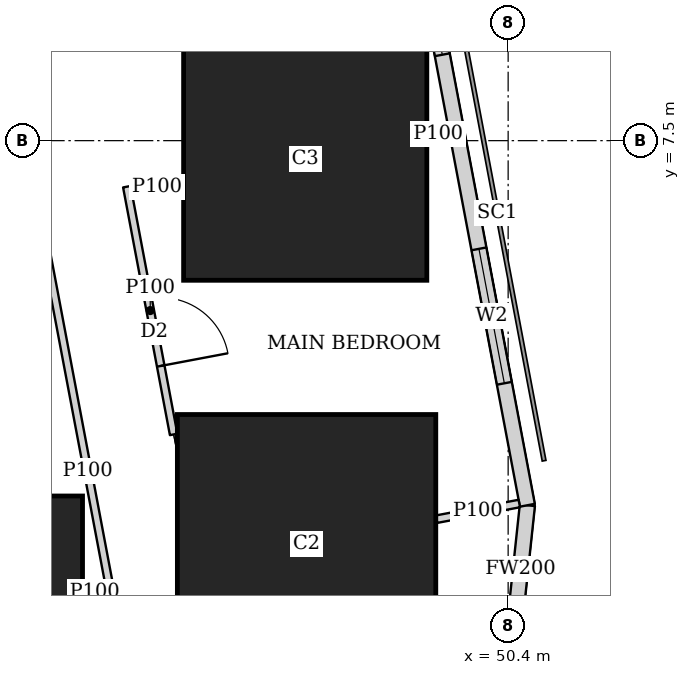
"""IFC4 building model, lengths in metres.
Left out: names, types, materials, properties, quantities, classifications, styles, units other than length and angle.
Written with IfcOpenShell. Run it as: python <this file> out.ifc"""

import sys

from ifc_helpers import new_model, si_unit, direction, frame, frame_2d, origin, origin_2d, place, context, subcontext, project, spatial, rectangle, extrude, element, fill, save


model = new_model("IFC4")
c1 = context("Model", 3, precision=1e-05, world=origin(), true_north=direction((0.0, 1.0)))
c2 = subcontext(c1, "Body", "Model", "MODEL_VIEW")
j1 = project(units=[si_unit("LENGTHUNIT", "METRE"), si_unit("PLANEANGLEUNIT", "RADIAN")], contexts=[c1])
p1 = place(None, origin())
s1 = spatial("IfcSite", under=j1, at=p1, CompositionType="ELEMENT")
p2 = place(p1, origin())
s2 = spatial("IfcBuilding", under=s1, at=p2, CompositionType="ELEMENT")
p3 = place(p2, frame((0.0, 0.0, 20.0)))
s3 = spatial("IfcBuildingStorey", under=s2, at=p3, CompositionType="ELEMENT", Elevation=20.0)
p4 = place(p3, frame((43.2, 1.225, 0.0), z_axis=(0.0, 0.0, 1.0), x_axis=(1.0, 0.0, 0.0)))
e1 = element("IfcColumn", 1, at=p4, inside=s3, PredefinedType="COLUMN", context=c2, shape_type="SweptSolid", body=[
    extrude(rectangle(XDim=3.2, YDim=3.2, at=origin_2d()), origin(), (0.0, 0.0, 1.0), 3.75),
])
p5 = place(p3, frame((47.748, 2.197, 0.0), z_axis=(0.0, 0.0, 1.0), x_axis=(1.0, 0.0, 0.0)))
e2 = element("IfcColumn", 2, at=p5, inside=s3, PredefinedType="COLUMN", context=c2, shape_type="SweptSolid", body=[
    extrude(rectangle(XDim=3.4, YDim=3.4, at=origin_2d()), origin(), (0.0, 0.0, 1.0), 3.75),
])
p6 = place(p3, frame((47.73, 7.263, -0.3), z_axis=(0.0, 0.0, 1.0), x_axis=(1.0, 0.0, 0.0)))
e3 = element("IfcColumn", 3, at=p6, inside=s3, PredefinedType="COLUMN", context=c2, shape_type="SweptSolid", body=[
    extrude(rectangle(XDim=3.2, YDim=3.2, at=origin_2d()), origin(), (0.0, 0.0, 1.0), 4.05),
])
p7 = place(p3, frame((50.474, 1.025, 0.0), z_axis=(0.0, 0.0, 1.0), x_axis=(0.106047815515, 0.994361031429, 0.0)))
e4 = element("IfcWall", 4, at=p7, inside=s3, PredefinedType="SOLIDWALL", context=c2, shape_type="SweptSolid", body=[
    extrude(rectangle(XDim=1.688, YDim=0.2, at=frame_2d((0.844, 0.0))), origin(), (0.0, 0.0, 1.0), 3.5),
])
p8 = place(p3, frame((50.653, 2.703, 0.0), z_axis=(0.0, 0.0, 1.0), x_axis=(-0.185612026696, 0.982623109613, 0.0)))
e5 = element("IfcWall", 5, at=p8, inside=s3, PredefinedType="SOLIDWALL", context=c2, shape_type="SweptSolid", body=[
    extrude(rectangle(XDim=41.393, YDim=0.2, at=frame_2d((20.697, 0.0))), origin(), (0.0, 0.0, 1.0), 3.5),
])
p9 = place(p8, frame((1.633, 0.0, 0.9)))
e6 = element("IfcOpeningElement", 6, at=p9, cuts=e5, PredefinedType="OPENING", context=c2, shape_type="SweptSolid", body=[
    extrude(rectangle(XDim=1.8, YDim=1.5, at=frame_2d((0.9, 0.75))), frame((0.0, 0.11, 0.0), z_axis=(0.0, -1.0, 0.0), x_axis=(1.0, 0.0, 0.0)), (0.0, 0.0, 1.0), 0.22),
])
p10 = place(p8, frame((6.032, 0.0, 0.9)))
e7 = element("IfcOpeningElement", 7, at=p10, cuts=e5, PredefinedType="OPENING", context=c2, shape_type="SweptSolid", body=[
    extrude(rectangle(XDim=1.8, YDim=1.5, at=frame_2d((0.9, 0.75))), frame((0.0, 0.11, 0.0), z_axis=(0.0, -1.0, 0.0), x_axis=(1.0, 0.0, 0.0)), (0.0, 0.0, 1.0), 0.22),
])
p11 = place(p8, frame((9.848, 0.0, 0.9)))
e8 = element("IfcOpeningElement", 8, at=p11, cuts=e5, PredefinedType="OPENING", context=c2, shape_type="SweptSolid", body=[
    extrude(rectangle(XDim=1.8, YDim=1.5, at=frame_2d((0.9, 0.75))), frame((0.0, 0.11, 0.0), z_axis=(0.0, -1.0, 0.0), x_axis=(1.0, 0.0, 0.0)), (0.0, 0.0, 1.0), 0.22),
])
p12 = place(p8, frame((17.481, 0.0, 0.9)))
e9 = element("IfcOpeningElement", 9, at=p12, cuts=e5, PredefinedType="OPENING", context=c2, shape_type="SweptSolid", body=[
    extrude(rectangle(XDim=1.8, YDim=1.5, at=frame_2d((0.9, 0.75))), frame((0.0, 0.11, 0.0), z_axis=(0.0, -1.0, 0.0), x_axis=(1.0, 0.0, 0.0)), (0.0, 0.0, 1.0), 0.22),
])
p13 = place(p8, frame((21.297, 0.0, 0.9)))
e10 = element("IfcOpeningElement", 10, at=p13, cuts=e5, PredefinedType="OPENING", context=c2, shape_type="SweptSolid", body=[
    extrude(rectangle(XDim=1.8, YDim=1.5, at=frame_2d((0.9, 0.75))), frame((0.0, 0.11, 0.0), z_axis=(0.0, -1.0, 0.0), x_axis=(1.0, 0.0, 0.0)), (0.0, 0.0, 1.0), 0.22),
])
p14 = place(p8, frame((25.113, 0.0, 0.9)))
e11 = element("IfcOpeningElement", 11, at=p14, cuts=e5, PredefinedType="OPENING", context=c2, shape_type="SweptSolid", body=[
    extrude(rectangle(XDim=1.8, YDim=1.5, at=frame_2d((0.9, 0.75))), frame((0.0, 0.11, 0.0), z_axis=(0.0, -1.0, 0.0), x_axis=(1.0, 0.0, 0.0)), (0.0, 0.0, 1.0), 0.22),
])
p15 = place(p8, frame((28.93, 0.0, 0.9)))
e12 = element("IfcOpeningElement", 12, at=p15, cuts=e5, PredefinedType="OPENING", context=c2, shape_type="SweptSolid", body=[
    extrude(rectangle(XDim=1.8, YDim=1.5, at=frame_2d((0.9, 0.75))), frame((0.0, 0.11, 0.0), z_axis=(0.0, -1.0, 0.0), x_axis=(1.0, 0.0, 0.0)), (0.0, 0.0, 1.0), 0.22),
])
p16 = place(p8, frame((32.746, 0.0, 0.9)))
e13 = element("IfcOpeningElement", 13, at=p16, cuts=e5, PredefinedType="OPENING", context=c2, shape_type="SweptSolid", body=[
    extrude(rectangle(XDim=1.8, YDim=1.5, at=frame_2d((0.9, 0.75))), frame((0.0, 0.11, 0.0), z_axis=(0.0, -1.0, 0.0), x_axis=(1.0, 0.0, 0.0)), (0.0, 0.0, 1.0), 0.22),
])
p17 = place(p8, frame((36.481, 0.0, 0.9)))
e14 = element("IfcOpeningElement", 14, at=p17, cuts=e5, PredefinedType="OPENING", context=c2, shape_type="SweptSolid", body=[
    extrude(rectangle(XDim=1.8, YDim=1.5, at=frame_2d((0.9, 0.75))), frame((0.0, 0.11, 0.0), z_axis=(0.0, -1.0, 0.0), x_axis=(1.0, 0.0, 0.0)), (0.0, 0.0, 1.0), 0.22),
])
p18 = place(p3, frame((45.383, 6.894, 0.0), z_axis=(0.0, 0.0, 1.0), x_axis=(0.185714962489, -0.982603660032, 0.0)))
e15 = element("IfcWall", 15, at=p18, inside=s3, PredefinedType="PARTITIONING", context=c2, shape_type="SweptSolid", body=[
    extrude(rectangle(XDim=3.317, YDim=0.1, at=frame_2d((1.658, 0.0))), origin(), (0.0, 0.0, 1.0), 3.5),
])
p19 = place(p18, frame((1.5, 0.0, 0.0)))
e16 = element("IfcOpeningElement", 16, at=p19, cuts=e15, PredefinedType="OPENING", context=c2, shape_type="SweptSolid", body=[
    extrude(rectangle(XDim=0.9, YDim=2.1, at=frame_2d((0.45, 1.05))), frame((0.0, 0.06, 0.0), z_axis=(0.0, -1.0, 0.0), x_axis=(1.0, 0.0, 0.0)), (0.0, 0.0, 1.0), 0.12),
])
p20 = place(p3, frame((44.149, 6.96, 0.0), z_axis=(0.0, 0.0, 1.0), x_axis=(0.185677796828, -0.982610683722, 0.0)))
e17 = element("IfcWall", 17, at=p20, inside=s3, PredefinedType="PARTITIONING", context=c2, shape_type="SweptSolid", body=[
    extrude(rectangle(XDim=7.745, YDim=0.1, at=frame_2d((3.872, 0.0))), origin(), (0.0, 0.0, 1.0), 2.1),
])
p21 = place(p3, frame((49.622, 7.62, 0.0), z_axis=(0.0, 0.0, 1.0), x_axis=(-0.982649953213, -0.185469861299, 0.0)))
e18 = element("IfcWall", 18, at=p21, inside=s3, PredefinedType="PARTITIONING", context=c2, shape_type="SweptSolid", body=[
    extrude(rectangle(XDim=0.287, YDim=0.1, at=frame_2d((0.144, 0.0))), origin(), (0.0, 0.0, 1.0), 3.5),
])
p22 = place(p3, frame((46.12, 6.959, 0.0), z_axis=(0.0, 0.0, 1.0), x_axis=(-0.982722777639, -0.185083608972, 0.0)))
e19 = element("IfcWall", 19, at=p22, inside=s3, PredefinedType="PARTITIONING", context=c2, shape_type="SweptSolid", body=[
    extrude(rectangle(XDim=0.686, YDim=0.1, at=frame_2d((0.343, 0.0))), origin(), (0.0, 0.0, 1.0), 3.5),
])
p23 = place(p3, frame((50.547, 2.726, 0.0), z_axis=(0.0, 0.0, 1.0), x_axis=(-0.982569158372, -0.185897415303, 0.0)))
e20 = element("IfcWall", 20, at=p23, inside=s3, PredefinedType="PARTITIONING", context=c2, shape_type="SweptSolid", body=[
    extrude(rectangle(XDim=1.108, YDim=0.1, at=frame_2d((0.554, 0.0))), origin(), (0.0, 0.0, 1.0), 3.5),
])
p24 = place(p3, frame((45.114, 1.587, 0.0), z_axis=(0.0, 0.0, 1.0), x_axis=(-0.982934694903, -0.183954846516, 0.0)))
e21 = element("IfcWall", 21, at=p24, inside=s3, PredefinedType="PARTITIONING", context=c2, shape_type="SweptSolid", body=[
    extrude(rectangle(XDim=0.309, YDim=0.1, at=frame_2d((0.155, 0.0))), origin(), (0.0, 0.0, 1.0), 2.1),
])
p25 = place(p9, origin())
e22 = element("IfcWindow", 22, at=p25, inside=s3, PartitioningType="SINGLE_PANEL", PredefinedType="WINDOW", context=c2, shape_type="SweptSolid", body=[
    extrude(rectangle(XDim=1.8, YDim=1.5, at=frame_2d((0.9, 0.75))), frame((0.0, 0.03, 0.0), z_axis=(0.0, -1.0, 0.0), x_axis=(1.0, 0.0, 0.0)), (0.0, 0.0, 1.0), 0.06),
])
fill(e6, e22)
p26 = place(p10, origin())
e23 = element("IfcWindow", 23, at=p26, inside=s3, PartitioningType="SINGLE_PANEL", PredefinedType="WINDOW", context=c2, shape_type="SweptSolid", body=[
    extrude(rectangle(XDim=1.8, YDim=1.5, at=frame_2d((0.9, 0.75))), frame((0.0, 0.03, 0.0), z_axis=(0.0, -1.0, 0.0), x_axis=(1.0, 0.0, 0.0)), (0.0, 0.0, 1.0), 0.06),
])
fill(e7, e23)
p27 = place(p19, origin())
e24 = element("IfcDoor", 24, at=p27, inside=s3, OperationType="SINGLE_SWING_RIGHT", PredefinedType="DOOR", context=c2, shape_type="SweptSolid", body=[
    extrude(rectangle(XDim=0.9, YDim=2.1, at=frame_2d((0.45, 1.05))), frame((0.0, 0.025, 0.0), z_axis=(0.0, -1.0, 0.0), x_axis=(1.0, 0.0, 0.0)), (0.0, 0.0, 1.0), 0.05),
])
fill(e16, e24)
save(model, sys.argv[1])
